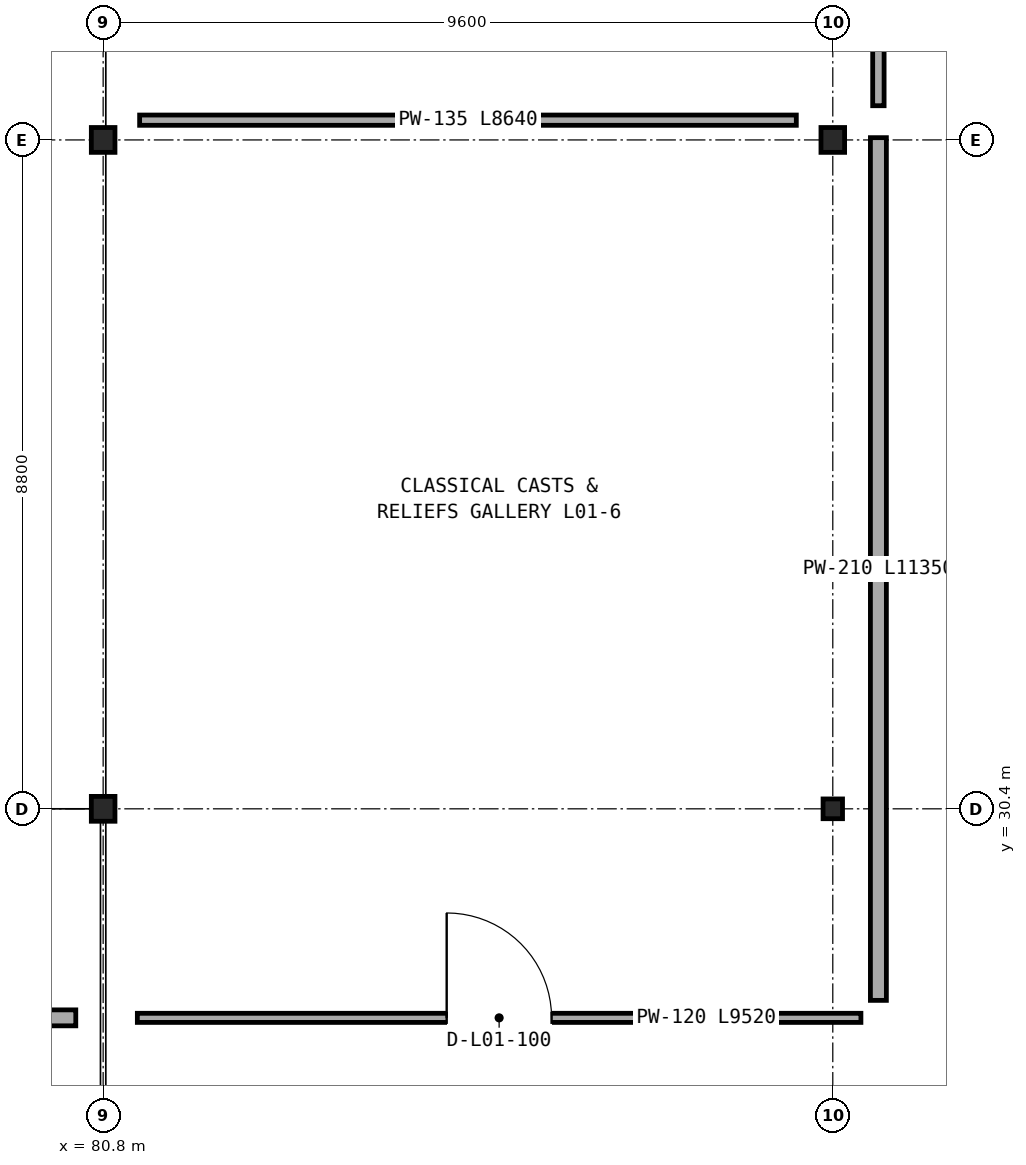
"""IFC4 building model, lengths in metres.
Left out: names, types, materials, properties, quantities, classifications, styles, units other than length and angle.
Written with IfcOpenShell. Run it as: python <this file> out.ifc"""

import sys

from ifc_helpers import new_model, si_unit, direction, frame, frame_2d, origin, origin_2d, place, context, subcontext, project, spatial, rectangle, i_section, extrude, element, fill, save


model = new_model("IFC4")
c1 = context("Model", 3, precision=1e-05, world=origin(), true_north=direction((0.0, 1.0)))
c2 = subcontext(c1, "Body", "Model", "MODEL_VIEW")
j1 = project(units=[si_unit("LENGTHUNIT", "METRE"), si_unit("PLANEANGLEUNIT", "RADIAN")], contexts=[c1])
p1 = place(None, origin())
s1 = spatial("IfcSite", under=j1, at=p1, CompositionType="ELEMENT")
p2 = place(p1, origin())
s2 = spatial("IfcBuilding", under=s1, at=p2, CompositionType="ELEMENT")
p3 = place(p2, frame((0.0, 0.0, 5.6)))
s3 = spatial("IfcBuildingStorey", under=s2, at=p3, CompositionType="ELEMENT", Elevation=5.6)
p4 = place(p3, frame((90.4, 30.4, 0.0), z_axis=(0.0, 0.0, 1.0), x_axis=(1.0, 0.0, 0.0)))
e1 = element("IfcColumn", 1, at=p4, inside=s3, PredefinedType="COLUMN", context=c2, shape_type="SweptSolid", body=[
    extrude(i_section(OverallWidth=0.256, OverallDepth=0.26, WebThickness=0.01, FlangeThickness=0.017, FilletRadius=0.013, at=origin_2d()), origin(), (0.0, 0.0, 1.0), 4.5),
])
for number, where, z_axis, x_axis in (
    (2, (90.4, 39.2, 0.0), (0.0, 0.0, 1.0), (1.0, 0.0, 0.0)),
    (3, (80.8, 30.4, 0.0), (0.0, 0.0, 1.0), (1.0, 0.0, 0.0)),
    (4, (80.8, 39.2, 0.0), (0.0, 0.0, 1.0), (1.0, 0.0, 0.0)),
):
    element("IfcColumn", number, at=place(p3, frame(where, z_axis=z_axis, x_axis=x_axis)), inside=s3, PredefinedType="COLUMN", context=c2, shape_type="SweptSolid", body=[
        extrude(i_section(OverallWidth=0.311, OverallDepth=0.327, WebThickness=0.016, FlangeThickness=0.025, FilletRadius=0.017, at=origin_2d()), origin(), (0.0, 0.0, 1.0), 4.5),
    ])
p5 = place(p3, frame((90.77, 27.65, 0.0), z_axis=(0.0, 0.0, 1.0), x_axis=(-1.0, 0.0, 0.0)))
e5 = element("IfcWall", 5, at=p5, inside=s3, PredefinedType="PARTITIONING", context=c2, shape_type="SweptSolid", body=[
    extrude(rectangle(XDim=9.52, YDim=0.12, at=frame_2d((4.76, 0.0))), origin(), (0.0, 0.0, 1.0), 3.803),
])
p6 = place(p5, frame((4.07, 0.0, 0.0)))
e6 = element("IfcOpeningElement", 6, at=p6, cuts=e5, PredefinedType="OPENING", context=c2, shape_type="SweptSolid", body=[
    extrude(rectangle(XDim=1.38, YDim=2.34, at=frame_2d((0.69, 1.17))), frame((0.0, 0.07, 0.0), z_axis=(0.0, -1.0, 0.0), x_axis=(1.0, 0.0, 0.0)), (0.0, 0.0, 1.0), 0.14),
])
p7 = place(p3, frame((91.0, 39.23, 0.0), z_axis=(0.0, 0.0, 1.0), x_axis=(0.0, -1.0, 0.0)))
e7 = element("IfcWall", 7, at=p7, inside=s3, PredefinedType="PARTITIONING", context=c2, shape_type="SweptSolid", body=[
    extrude(rectangle(XDim=11.35, YDim=0.21, at=frame_2d((5.675, 0.0))), origin(), (0.0, 0.0, 1.0), 3.613),
])
p8 = place(p3, frame((91.0, 50.92, 0.0), z_axis=(0.0, 0.0, 1.0), x_axis=(0.0, -1.0, 0.0)))
e8 = element("IfcWall", 8, at=p8, inside=s3, PredefinedType="PARTITIONING", context=c2, shape_type="SweptSolid", body=[
    extrude(rectangle(XDim=11.27, YDim=0.15, at=frame_2d((5.635, 0.0))), origin(), (0.0, 0.0, 1.0), 3.613),
])
p9 = place(p3, frame((80.44, 27.65, 0.0), z_axis=(0.0, 0.0, 1.0), x_axis=(-1.0, 0.0, 0.0)))
e9 = element("IfcWall", 9, at=p9, inside=s3, PredefinedType="PARTITIONING", context=c2, shape_type="SweptSolid", body=[
    extrude(rectangle(XDim=2.04, YDim=0.21, at=frame_2d((1.02, 0.0))), origin(), (0.0, 0.0, 1.0), 4.13),
])
p10 = place(p9, frame((0.55, 0.0, 0.0)))
e10 = element("IfcOpeningElement", 10, at=p10, cuts=e9, PredefinedType="OPENING", context=c2, shape_type="SweptSolid", body=[
    extrude(rectangle(XDim=0.94, YDim=2.08, at=frame_2d((0.47, 1.04))), frame((0.0, 0.115, 0.0), z_axis=(0.0, -1.0, 0.0), x_axis=(1.0, 0.0, 0.0)), (0.0, 0.0, 1.0), 0.23),
])
p11 = place(p3, frame((81.28, 39.46, 0.0), z_axis=(0.0, 0.0, 1.0), x_axis=(1.0, 0.0, 0.0)))
e11 = element("IfcWall", 11, at=p11, inside=s3, PredefinedType="PARTITIONING", context=c2, shape_type="SweptSolid", body=[
    extrude(rectangle(XDim=8.64, YDim=0.135, at=frame_2d((4.32, 0.0))), origin(), (0.0, 0.0, 1.0), 3.613),
])
p12 = place(p6, frame((1.38, 0.0, 0.0), z_axis=(0.0, 0.0, 1.0), x_axis=(-1.0, 0.0, 0.0)))
e12 = element("IfcDoor", 12, at=p12, inside=s3, OperationType="SINGLE_SWING_RIGHT", PredefinedType="DOOR", context=c2, shape_type="SweptSolid", body=[
    extrude(rectangle(XDim=1.38, YDim=2.34, at=frame_2d((0.69, 1.17))), frame((0.0, 0.025, 0.0), z_axis=(0.0, -1.0, 0.0), x_axis=(1.0, 0.0, 0.0)), (0.0, 0.0, 1.0), 0.05),
])
fill(e6, e12)
save(model, sys.argv[1])
